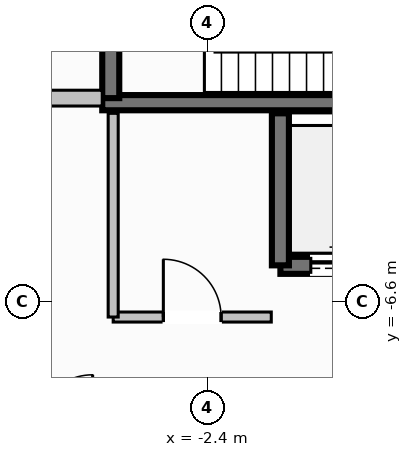
"""IFC4 building model, lengths in metres.
Left out: names, types, materials, properties, quantities, classifications, styles, units other than length and angle.
Written with IfcOpenShell. Run it as: python <this file> out.ifc"""

import sys

from ifc_helpers import new_model, si_unit, direction, frame, frame_2d, origin, place, context, subcontext, project, spatial, rectangle, extrude, element, fill, save


model = new_model("IFC4")
c1 = context("Model", 3, precision=1e-05, world=origin(), true_north=direction((0.0, 1.0)))
c2 = subcontext(c1, "Body", "Model", "MODEL_VIEW")
j1 = project(units=[si_unit("LENGTHUNIT", "METRE"), si_unit("PLANEANGLEUNIT", "RADIAN")], contexts=[c1])
p1 = place(None, origin())
s1 = spatial("IfcSite", under=j1, at=p1, CompositionType="ELEMENT")
p2 = place(p1, origin())
s2 = spatial("IfcBuilding", under=s1, at=p2, CompositionType="ELEMENT")
p3 = place(p2, frame((0.0, 0.0, 113.4)))
s3 = spatial("IfcBuildingStorey", under=s2, at=p3, CompositionType="ELEMENT", Elevation=113.4)
p4 = place(p3, frame((-4.13, -3.325, 0.0), z_axis=(0.0, 0.0, 1.0), x_axis=(1.0, 0.0, 0.0)))
e1 = element("IfcWall", 1, at=p4, inside=s3, PredefinedType="SOLIDWALL", context=c2, shape_type="SweptSolid", body=[
    extrude(rectangle(XDim=8.26, YDim=0.25, at=frame_2d((4.13, 0.0))), origin(), (0.0, 0.0, 1.0), 3.6),
])
p5 = place(p3, frame((-1.2, -6.0, 0.0), z_axis=(0.0, 0.0, 1.0), x_axis=(1.0, 0.0, 0.0)))
e2 = element("IfcWall", 2, at=p5, inside=s3, PredefinedType="SOLIDWALL", context=c2, shape_type="SweptSolid", body=[
    extrude(rectangle(XDim=2.1, YDim=0.28, at=frame_2d((1.05, 0.0))), origin(), (0.0, 0.0, 1.0), 3.35),
])
p6 = place(p5, frame((0.5, 0.0, 0.0)))
e3 = element("IfcOpeningElement", 3, at=p6, cuts=e2, PredefinedType="OPENING", context=c2, shape_type="SweptSolid", body=[
    extrude(rectangle(XDim=1.1, YDim=2.2, at=frame_2d((0.55, 1.1))), frame((0.0, 0.15, 0.0), z_axis=(0.0, -1.0, 0.0), x_axis=(1.0, 0.0, 0.0)), (0.0, 0.0, 1.0), 0.3),
])
p7 = place(p3, frame((-1.2, -3.5, 0.0), z_axis=(0.0, 0.0, 1.0), x_axis=(0.0, -1.0, 0.0)))
e4 = element("IfcWall", 4, at=p7, inside=s3, PredefinedType="SOLIDWALL", context=c2, shape_type="SweptSolid", body=[
    extrude(rectangle(XDim=2.5, YDim=0.28, at=frame_2d((1.25, 0.0))), origin(), (0.0, 0.0, 1.0), 3.35),
])
p8 = place(p3, frame((-3.99, -3.25, 0.0), z_axis=(0.0, 0.0, 1.0), x_axis=(0.0, 1.0, 0.0)))
e5 = element("IfcWall", 5, at=p8, inside=s3, PredefinedType="SOLIDWALL", context=c2, shape_type="SweptSolid", body=[
    extrude(rectangle(XDim=5.46, YDim=0.28, at=frame_2d((2.73, 0.0))), origin(), (0.0, 0.0, 1.0), 3.35),
])
p9 = place(p8, frame((0.937, 0.0, 0.0)))
e6 = element("IfcOpeningElement", 6, at=p9, cuts=e5, PredefinedType="OPENING", context=c2, shape_type="SweptSolid", body=[
    extrude(rectangle(XDim=1.2, YDim=2.2, at=frame_2d((0.6, 1.1))), frame((0.0, 0.15, 0.0), z_axis=(0.0, -1.0, 0.0), x_axis=(1.0, 0.0, 0.0)), (0.0, 0.0, 1.0), 0.3),
])
p10 = place(p3, frame((-7.225, -3.25, 0.0), z_axis=(0.0, 0.0, 1.0), x_axis=(1.0, 0.0, 0.0)))
e7 = element("IfcWall", 7, at=p10, inside=s3, PredefinedType="PARTITIONING", context=c2, shape_type="SweptSolid", body=[
    extrude(rectangle(XDim=3.095, YDim=0.26, at=frame_2d((1.548, 0.0))), origin(), (0.0, 0.0, 1.0), 3.35),
])
p11 = place(p3, frame((-3.95, -6.85, 0.0), z_axis=(0.0, 0.0, 1.0), x_axis=(1.0, 0.0, 0.0)))
e8 = element("IfcWall", 8, at=p11, inside=s3, PredefinedType="PARTITIONING", context=c2, shape_type="SweptSolid", body=[
    extrude(rectangle(XDim=2.6, YDim=0.165, at=frame_2d((1.3, 0.0))), origin(), (0.0, 0.0, 1.0), 2.435),
])
p12 = place(p11, frame((0.825, 0.0, 0.0)))
e9 = element("IfcOpeningElement", 9, at=p12, cuts=e8, PredefinedType="OPENING", context=c2, shape_type="SweptSolid", body=[
    extrude(rectangle(XDim=0.95, YDim=2.1, at=frame_2d((0.475, 1.05))), frame((0.0, 0.093, 0.0), z_axis=(0.0, -1.0, 0.0), x_axis=(1.0, 0.0, 0.0)), (0.0, 0.0, 1.0), 0.185),
])
p13 = place(p3, frame((-3.95, -3.5, 0.0), z_axis=(0.0, 0.0, 1.0), x_axis=(0.0, -1.0, 0.0)))
e10 = element("IfcWall", 10, at=p13, inside=s3, PredefinedType="PARTITIONING", context=c2, shape_type="SweptSolid", body=[
    extrude(rectangle(XDim=3.35, YDim=0.165, at=frame_2d((1.675, 0.0))), origin(), (0.0, 0.0, 1.0), 3.35),
])
p14 = place(p6, origin())
e11 = element("IfcDoor", 11, at=p14, inside=s3, OperationType="SLIDING_TO_LEFT", PredefinedType="DOOR", context=c2, shape_type="SweptSolid", body=[
    extrude(rectangle(XDim=1.1, YDim=2.2, at=frame_2d((0.55, 1.1))), frame((0.0, 0.025, 0.0), z_axis=(0.0, -1.0, 0.0), x_axis=(1.0, 0.0, 0.0)), (0.0, 0.0, 1.0), 0.05),
])
fill(e3, e11)
p15 = place(p12, origin())
e12 = element("IfcDoor", 12, at=p15, inside=s3, OperationType="SINGLE_SWING_LEFT", PredefinedType="DOOR", context=c2, shape_type="SweptSolid", body=[
    extrude(rectangle(XDim=0.95, YDim=2.1, at=frame_2d((0.475, 1.05))), frame((0.0, 0.025, 0.0), z_axis=(0.0, -1.0, 0.0), x_axis=(1.0, 0.0, 0.0)), (0.0, 0.0, 1.0), 0.05),
])
fill(e9, e12)
save(model, sys.argv[1])
